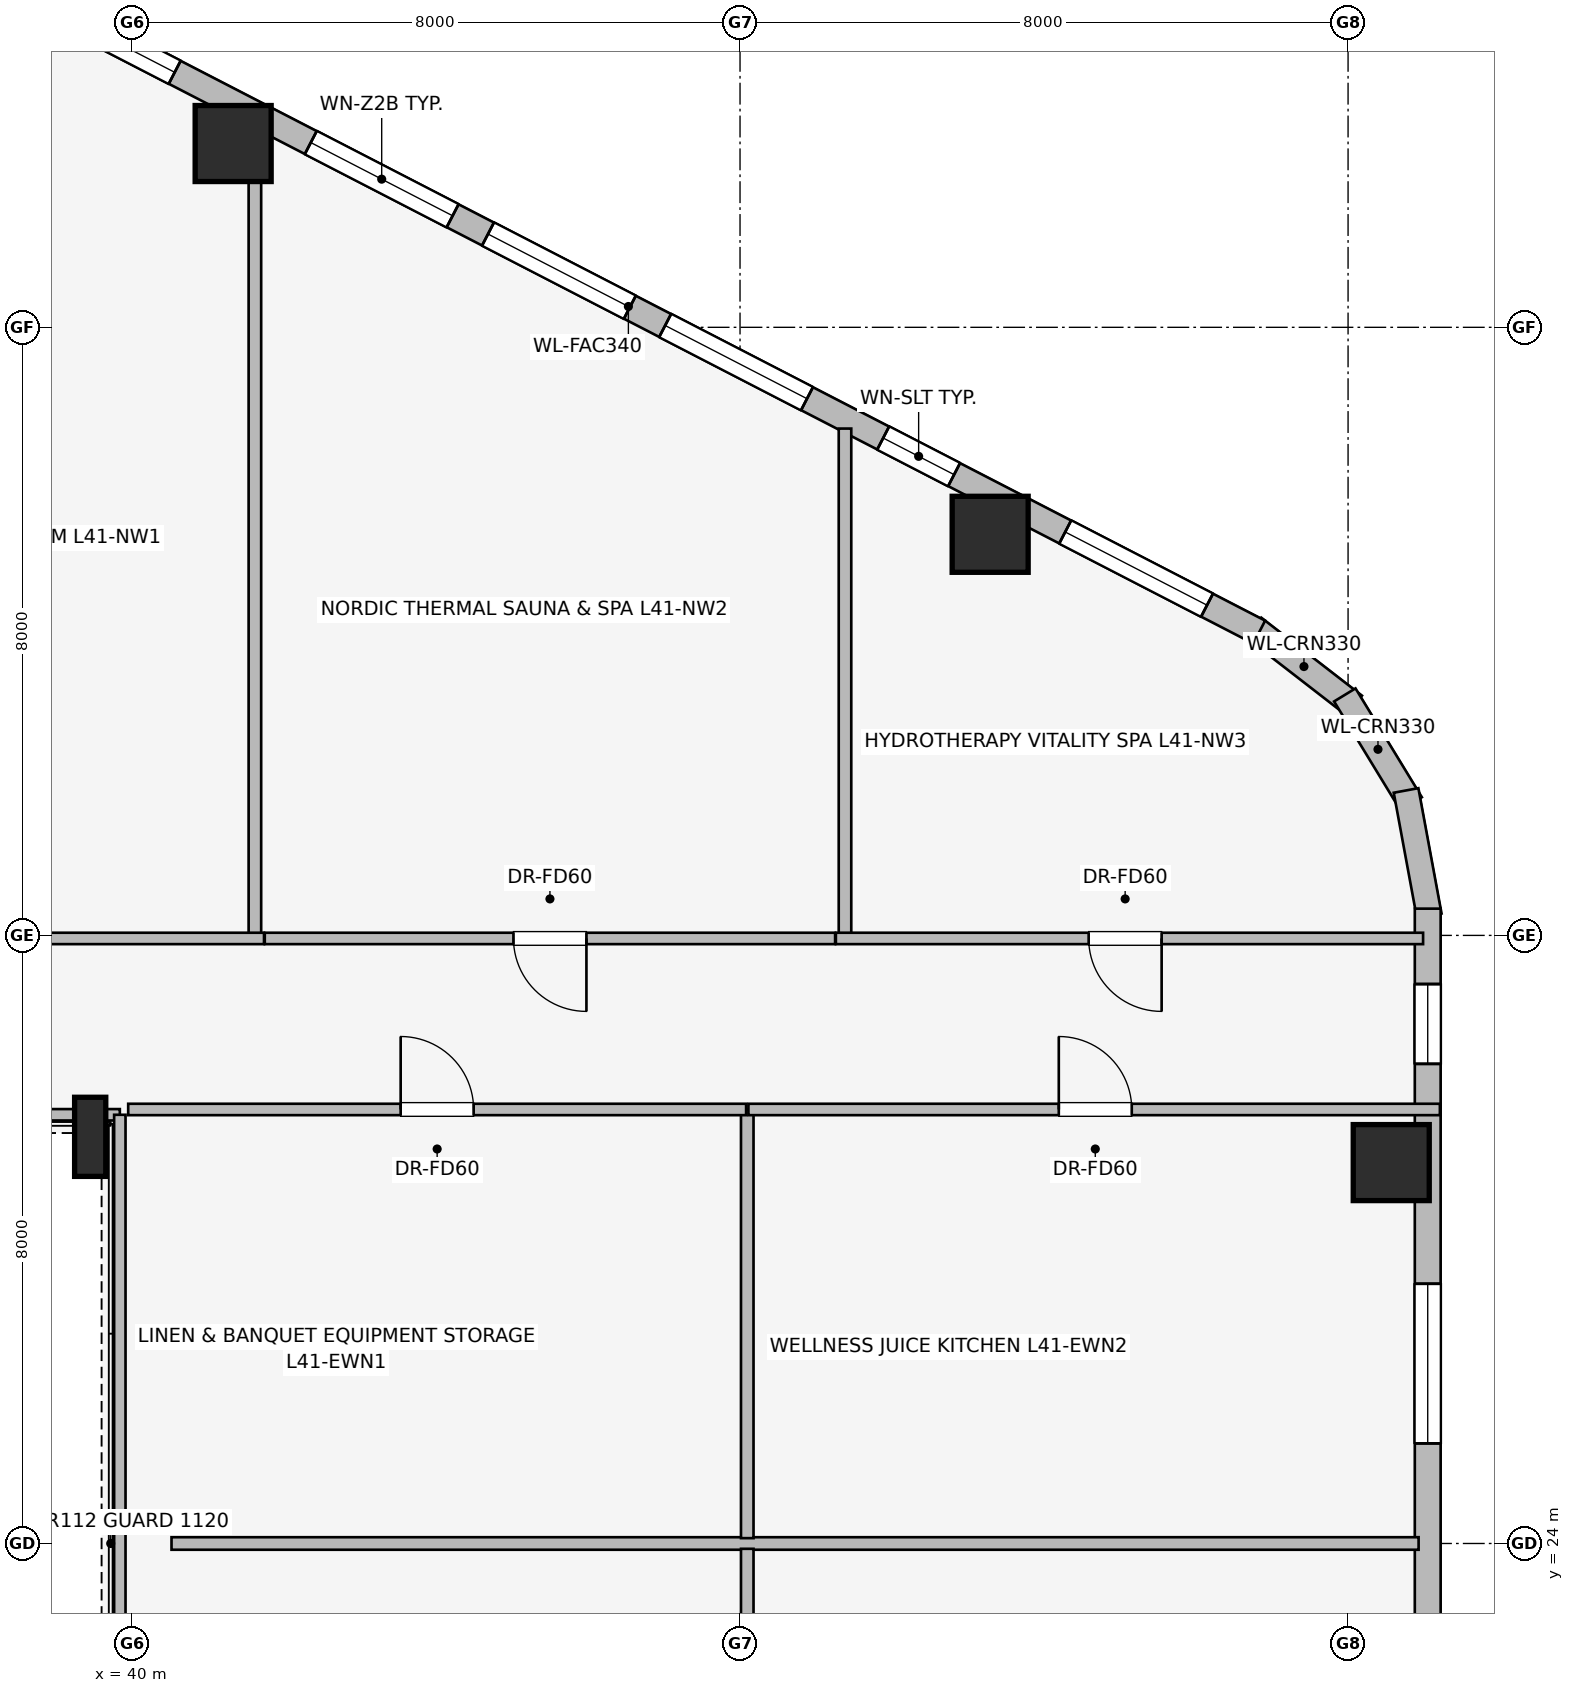
"""IFC4 building model, lengths in metres.
Left out: names, types, materials, properties, quantities, classifications, styles, units other than length and angle.
Written with IfcOpenShell. Run it as: python <this file> out.ifc"""

import sys

from ifc_helpers import new_model, si_unit, direction, frame, frame_2d, origin, origin_2d, place, context, subcontext, project, spatial, rectangle, i_section, extrude, element, fill, save


model = new_model("IFC4")
c1 = context("Model", 3, precision=1e-05, world=origin(), true_north=direction((0.0, 1.0)))
c2 = subcontext(c1, "Body", "Model", "MODEL_VIEW")
j1 = project(units=[si_unit("LENGTHUNIT", "METRE"), si_unit("PLANEANGLEUNIT", "RADIAN")], contexts=[c1])
p1 = place(None, origin())
s1 = spatial("IfcSite", under=j1, at=p1, CompositionType="ELEMENT")
p2 = place(p1, origin())
s2 = spatial("IfcBuilding", under=s1, at=p2, CompositionType="ELEMENT")
p3 = place(p2, frame((0.0, 0.0, 153.3)))
s3 = spatial("IfcBuildingStorey", under=s2, at=p3, CompositionType="ELEMENT", Elevation=153.3)
for number, where, z_axis, x_axis in (
    (1, (51.291, 37.277, 0.0), (0.0, 0.0, 1.0), (1.0, 0.0, 0.0)),
    (2, (41.331, 42.418, 0.0), (0.0, 0.0, 1.0), (1.0, 0.0, 0.0)),
    (3, (56.568, 29.011, 0.0), (0.0, 0.0, 1.0), (1.0, 0.0, 0.0)),
):
    element("IfcColumn", number, at=place(p3, frame(where, z_axis=z_axis, x_axis=x_axis)), inside=s3, PredefinedType="COLUMN", context=c2, shape_type="SweptSolid", body=[
        extrude(rectangle(XDim=1.0, YDim=1.0, at=origin_2d()), origin(), (0.0, 0.0, 1.0), 3.45),
    ])
p4 = place(p3, frame((39.45, 29.35, 0.0), z_axis=(0.0, 0.0, 1.0), x_axis=(1.0, 0.0, 0.0)))
e4 = element("IfcColumn", 4, at=p4, inside=s3, PredefinedType="COLUMN", context=c2, shape_type="SweptSolid", body=[
    extrude(i_section(OverallWidth=0.41, OverallDepth=1.041, WebThickness=0.031, FlangeThickness=0.056, at=origin_2d()), origin(), (0.0, 0.0, 1.0), 3.45),
])
p5 = place(p3, frame((54.757, 36.05, 0.0), z_axis=(0.0, 0.0, 1.0), x_axis=(0.790621329885, -0.612305408053, 0.0)))
e5 = element("IfcWall", 5, at=p5, inside=s3, PredefinedType="STANDARD", context=c2, shape_type="SweptSolid", body=[
    extrude(rectangle(XDim=1.676, YDim=0.33, at=frame_2d((0.838, 0.0))), origin(), (0.0, 0.0, 1.0), 3.19),
])
p6 = place(p3, frame((55.957, 35.164, 0.0), z_axis=(0.0, 0.0, 1.0), x_axis=(0.520519429557, -0.853849824883, 0.0)))
e6 = element("IfcWall", 6, at=p6, inside=s3, PredefinedType="STANDARD", context=c2, shape_type="SweptSolid", body=[
    extrude(rectangle(XDim=1.677, YDim=0.33, at=frame_2d((0.839, 0.0))), origin(), (0.0, 0.0, 1.0), 3.19),
])
p7 = place(p3, frame((56.763, 33.907, 0.0), z_axis=(0.0, 0.0, 1.0), x_axis=(0.181984991895, -0.983301308209, 0.0)))
e7 = element("IfcWall", 7, at=p7, inside=s3, PredefinedType="STANDARD", context=c2, shape_type="SweptSolid", body=[
    extrude(rectangle(XDim=1.677, YDim=0.33, at=frame_2d((0.838, 0.0))), origin(), (0.0, 0.0, 1.0), 3.19),
])
p8 = place(p3, frame((38.231, 44.558, 0.0), z_axis=(0.0, 0.0, 1.0), x_axis=(0.888613612362, -0.458656568606, 0.0)))
e8 = element("IfcWall", 8, at=p8, inside=s3, PredefinedType="STANDARD", context=c2, shape_type="SweptSolid", body=[
    extrude(rectangle(XDim=18.681, YDim=0.34, at=frame_2d((9.34, 0.0))), origin(), (0.0, 0.0, 1.0), 3.19),
])
p9 = place(p8, frame((1.023, 0.0, 0.75)))
e9 = element("IfcOpeningElement", 9, at=p9, cuts=e8, PredefinedType="OPENING", context=c2, shape_type="SweptSolid", body=[
    extrude(rectangle(XDim=1.6, YDim=1.55, at=frame_2d((0.8, 0.775))), frame((0.0, 0.18, 0.0), z_axis=(0.0, -1.0, 0.0), x_axis=(1.0, 0.0, 0.0)), (0.0, 0.0, 1.0), 0.36),
])
p10 = place(p8, frame((4.638, 0.0, 0.75)))
e10 = element("IfcOpeningElement", 10, at=p10, cuts=e8, PredefinedType="OPENING", context=c2, shape_type="SweptSolid", body=[
    extrude(rectangle(XDim=2.1, YDim=1.5, at=frame_2d((1.05, 0.75))), frame((0.0, 0.18, 0.0), z_axis=(0.0, -1.0, 0.0), x_axis=(1.0, 0.0, 0.0)), (0.0, 0.0, 1.0), 0.36),
])
p11 = place(p8, frame((7.262, 0.0, 0.75)))
e11 = element("IfcOpeningElement", 11, at=p11, cuts=e8, PredefinedType="OPENING", context=c2, shape_type="SweptSolid", body=[
    extrude(rectangle(XDim=2.1, YDim=1.5, at=frame_2d((1.05, 0.75))), frame((0.0, 0.18, 0.0), z_axis=(0.0, -1.0, 0.0), x_axis=(1.0, 0.0, 0.0)), (0.0, 0.0, 1.0), 0.36),
])
p12 = place(p8, frame((9.885, 0.0, 0.75)))
e12 = element("IfcOpeningElement", 12, at=p12, cuts=e8, PredefinedType="OPENING", context=c2, shape_type="SweptSolid", body=[
    extrude(rectangle(XDim=2.1, YDim=1.5, at=frame_2d((1.05, 0.75))), frame((0.0, 0.18, 0.0), z_axis=(0.0, -1.0, 0.0), x_axis=(1.0, 0.0, 0.0)), (0.0, 0.0, 1.0), 0.36),
])
p13 = place(p8, frame((13.113, 0.0, 0.75)))
e13 = element("IfcOpeningElement", 13, at=p13, cuts=e8, PredefinedType="OPENING", context=c2, shape_type="SweptSolid", body=[
    extrude(rectangle(XDim=1.05, YDim=1.4, at=frame_2d((0.525, 0.7))), frame((0.0, 0.18, 0.0), z_axis=(0.0, -1.0, 0.0), x_axis=(1.0, 0.0, 0.0)), (0.0, 0.0, 1.0), 0.36),
])
p14 = place(p8, frame((15.808, 0.0, 0.75)))
e14 = element("IfcOpeningElement", 14, at=p14, cuts=e8, PredefinedType="OPENING", context=c2, shape_type="SweptSolid", body=[
    extrude(rectangle(XDim=2.1, YDim=1.5, at=frame_2d((1.05, 0.75))), frame((0.0, 0.18, 0.0), z_axis=(0.0, -1.0, 0.0), x_axis=(1.0, 0.0, 0.0)), (0.0, 0.0, 1.0), 0.36),
])
p15 = place(p3, frame((57.048, 32.352, 0.0), z_axis=(0.0, 0.0, 1.0), x_axis=(0.0, -1.0, 0.0)))
e15 = element("IfcWall", 15, at=p15, inside=s3, PredefinedType="STANDARD", context=c2, shape_type="SweptSolid", body=[
    extrude(rectangle(XDim=16.704, YDim=0.34, at=frame_2d((8.352, 0.0))), origin(), (0.0, 0.0, 1.0), 3.19),
])
p16 = place(p15, frame((0.992, 0.0, 0.75)))
e16 = element("IfcOpeningElement", 16, at=p16, cuts=e15, PredefinedType="OPENING", context=c2, shape_type="SweptSolid", body=[
    extrude(rectangle(XDim=1.05, YDim=1.4, at=frame_2d((0.525, 0.7))), frame((0.0, 0.18, 0.0), z_axis=(0.0, -1.0, 0.0), x_axis=(1.0, 0.0, 0.0)), (0.0, 0.0, 1.0), 0.36),
])
p17 = place(p15, frame((4.935, 0.0, 0.75)))
e17 = element("IfcOpeningElement", 17, at=p17, cuts=e15, PredefinedType="OPENING", context=c2, shape_type="SweptSolid", body=[
    extrude(rectangle(XDim=2.1, YDim=1.5, at=frame_2d((1.05, 0.75))), frame((0.0, 0.18, 0.0), z_axis=(0.0, -1.0, 0.0), x_axis=(1.0, 0.0, 0.0)), (0.0, 0.0, 1.0), 0.36),
])
p18 = place(p15, frame((9.919, 0.0, 0.75)))
e18 = element("IfcOpeningElement", 18, at=p18, cuts=e15, PredefinedType="OPENING", context=c2, shape_type="SweptSolid", body=[
    extrude(rectangle(XDim=1.6, YDim=1.55, at=frame_2d((0.8, 0.775))), frame((0.0, 0.18, 0.0), z_axis=(0.0, -1.0, 0.0), x_axis=(1.0, 0.0, 0.0)), (0.0, 0.0, 1.0), 0.36),
])
p19 = place(p15, frame((14.702, 0.0, 0.75)))
e19 = element("IfcOpeningElement", 19, at=p19, cuts=e15, PredefinedType="OPENING", context=c2, shape_type="SweptSolid", body=[
    extrude(rectangle(XDim=1.05, YDim=1.4, at=frame_2d((0.525, 0.7))), frame((0.0, 0.18, 0.0), z_axis=(0.0, -1.0, 0.0), x_axis=(1.0, 0.0, 0.0)), (0.0, 0.0, 1.0), 0.36),
])
p20 = place(p3, frame((39.84, 29.64, 0.0), z_axis=(0.0, 0.0, 1.0), x_axis=(-1.0, 0.0, 0.0)))
e20 = element("IfcWall", 20, at=p20, inside=s3, PredefinedType="PARTITIONING", context=c2, shape_type="SweptSolid", body=[
    extrude(rectangle(XDim=12.2, YDim=0.15, at=frame_2d((6.1, 0.0))), origin(), (0.0, 0.0, 1.0), 2.331),
])
p21 = place(p3, frame((39.84, 18.36, 0.0), z_axis=(0.0, 0.0, 1.0), x_axis=(0.0, 1.0, 0.0)))
e21 = element("IfcWall", 21, at=p21, inside=s3, PredefinedType="PARTITIONING", context=c2, shape_type="SweptSolid", body=[
    extrude(rectangle(XDim=11.28, YDim=0.15, at=frame_2d((5.64, 0.0))), origin(), (0.0, 0.0, 1.0), 3.19),
])
p22 = place(p3, frame((41.617, 31.97, 0.0), z_axis=(0.0, 0.0, 1.0), x_axis=(0.0, 1.0, 0.0)))
e22 = element("IfcWall", 22, at=p22, inside=s3, PredefinedType="PARTITIONING", context=c2, shape_type="SweptSolid", body=[
    extrude(rectangle(XDim=10.705, YDim=0.165, at=frame_2d((5.353, 0.0))), origin(), (0.0, 0.0, 1.0), 2.42),
])
p23 = place(p3, frame((49.381, 31.97, 0.0), z_axis=(0.0, 0.0, 1.0), x_axis=(0.0, 1.0, 0.0)))
e23 = element("IfcWall", 23, at=p23, inside=s3, PredefinedType="PARTITIONING", context=c2, shape_type="SweptSolid", body=[
    extrude(rectangle(XDim=6.698, YDim=0.165, at=frame_2d((3.349, 0.0))), origin(), (0.0, 0.0, 1.0), 3.19),
])
p24 = place(p3, frame((41.737, 31.96, 0.0), z_axis=(0.0, 0.0, 1.0), x_axis=(-1.0, 0.0, 0.0)))
e24 = element("IfcWall", 24, at=p24, inside=s3, PredefinedType="PARTITIONING", context=c2, shape_type="SweptSolid", body=[
    extrude(rectangle(XDim=7.447, YDim=0.15, at=frame_2d((3.724, 0.0))), origin(), (0.0, 0.0, 1.0), 3.19),
])
p25 = place(p24, frame((3.187, 0.0, 0.0)))
e25 = element("IfcOpeningElement", 25, at=p25, cuts=e24, PredefinedType="OPENING", context=c2, shape_type="SweptSolid", body=[
    extrude(rectangle(XDim=0.96, YDim=2.0, at=frame_2d((0.48, 1.0))), frame((0.0, 0.085, 0.0), z_axis=(0.0, -1.0, 0.0), x_axis=(1.0, 0.0, 0.0)), (0.0, 0.0, 1.0), 0.17),
])
p26 = place(p3, frame((49.251, 31.96, 0.0), z_axis=(0.0, 0.0, 1.0), x_axis=(-1.0, 0.0, 0.0)))
e26 = element("IfcWall", 26, at=p26, inside=s3, PredefinedType="PARTITIONING", context=c2, shape_type="SweptSolid", body=[
    extrude(rectangle(XDim=7.504, YDim=0.15, at=frame_2d((3.752, 0.0))), origin(), (0.0, 0.0, 1.0), 3.19),
])
p27 = place(p26, frame((3.272, 0.0, 0.0)))
e27 = element("IfcOpeningElement", 27, at=p27, cuts=e26, PredefinedType="OPENING", context=c2, shape_type="SweptSolid", body=[
    extrude(rectangle(XDim=0.96, YDim=2.0, at=frame_2d((0.48, 1.0))), frame((0.0, 0.085, 0.0), z_axis=(0.0, -1.0, 0.0), x_axis=(1.0, 0.0, 0.0)), (0.0, 0.0, 1.0), 0.17),
])
p28 = place(p3, frame((56.987, 31.96, 0.0), z_axis=(0.0, 0.0, 1.0), x_axis=(-1.0, 0.0, 0.0)))
e28 = element("IfcWall", 28, at=p28, inside=s3, PredefinedType="PARTITIONING", context=c2, shape_type="SweptSolid", body=[
    extrude(rectangle(XDim=7.726, YDim=0.15, at=frame_2d((3.863, 0.0))), origin(), (0.0, 0.0, 1.0), 3.19),
])
p29 = place(p28, frame((3.44, 0.0, 0.0)))
e29 = element("IfcOpeningElement", 29, at=p29, cuts=e28, PredefinedType="OPENING", context=c2, shape_type="SweptSolid", body=[
    extrude(rectangle(XDim=0.96, YDim=2.0, at=frame_2d((0.48, 1.0))), frame((0.0, 0.085, 0.0), z_axis=(0.0, -1.0, 0.0), x_axis=(1.0, 0.0, 0.0)), (0.0, 0.0, 1.0), 0.17),
])
p30 = place(p3, frame((40.52, 24.0, 0.0), z_axis=(0.0, 0.0, 1.0), x_axis=(1.0, 0.0, 0.0)))
e30 = element("IfcWall", 30, at=p30, inside=s3, PredefinedType="PARTITIONING", context=c2, shape_type="SweptSolid", body=[
    extrude(rectangle(XDim=16.408, YDim=0.165, at=frame_2d((8.204, 0.0))), origin(), (0.0, 0.0, 1.0), 3.19),
])
p31 = place(p3, frame((48.095, 24.07, 0.0), z_axis=(0.0, 0.0, 1.0), x_axis=(0.0, 1.0, 0.0)))
e31 = element("IfcWall", 31, at=p31, inside=s3, PredefinedType="PARTITIONING", context=c2, shape_type="SweptSolid", body=[
    extrude(rectangle(XDim=5.64, YDim=0.165, at=frame_2d((2.82, 0.0))), origin(), (0.0, 0.0, 1.0), 3.19),
])
p32 = place(p3, frame((39.95, 29.71, 0.0), z_axis=(0.0, 0.0, 1.0), x_axis=(1.0, 0.0, 0.0)))
e32 = element("IfcWall", 32, at=p32, inside=s3, PredefinedType="PARTITIONING", context=c2, shape_type="SweptSolid", body=[
    extrude(rectangle(XDim=8.13, YDim=0.15, at=frame_2d((4.065, 0.0))), origin(), (0.0, 0.0, 1.0), 3.19),
])
p33 = place(p32, frame((3.585, 0.0, 0.0)))
e33 = element("IfcOpeningElement", 33, at=p33, cuts=e32, PredefinedType="OPENING", context=c2, shape_type="SweptSolid", body=[
    extrude(rectangle(XDim=0.96, YDim=2.0, at=frame_2d((0.48, 1.0))), frame((0.0, 0.085, 0.0), z_axis=(0.0, -1.0, 0.0), x_axis=(1.0, 0.0, 0.0)), (0.0, 0.0, 1.0), 0.17),
])
p34 = place(p3, frame((48.11, 29.71, 0.0), z_axis=(0.0, 0.0, 1.0), x_axis=(1.0, 0.0, 0.0)))
e34 = element("IfcWall", 34, at=p34, inside=s3, PredefinedType="PARTITIONING", context=c2, shape_type="SweptSolid", body=[
    extrude(rectangle(XDim=9.098, YDim=0.15, at=frame_2d((4.549, 0.0))), origin(), (0.0, 0.0, 1.0), 3.19),
])
p35 = place(p34, frame((4.084, 0.0, 0.0)))
e35 = element("IfcOpeningElement", 35, at=p35, cuts=e34, PredefinedType="OPENING", context=c2, shape_type="SweptSolid", body=[
    extrude(rectangle(XDim=0.96, YDim=2.0, at=frame_2d((0.48, 1.0))), frame((0.0, 0.085, 0.0), z_axis=(0.0, -1.0, 0.0), x_axis=(1.0, 0.0, 0.0)), (0.0, 0.0, 1.0), 0.17),
])
p36 = place(p3, frame((48.095, 18.29, 0.0), z_axis=(0.0, 0.0, 1.0), x_axis=(0.0, 1.0, 0.0)))
e36 = element("IfcWall", 36, at=p36, inside=s3, PredefinedType="PARTITIONING", context=c2, shape_type="SweptSolid", body=[
    extrude(rectangle(XDim=5.64, YDim=0.165, at=frame_2d((2.82, 0.0))), origin(), (0.0, 0.0, 1.0), 3.19),
])
p37 = place(p9, origin())
e37 = element("IfcWindow", 37, at=p37, inside=s3, PartitioningType="SINGLE_PANEL", PredefinedType="WINDOW", context=c2, shape_type="SweptSolid", body=[
    extrude(rectangle(XDim=1.6, YDim=1.55, at=frame_2d((0.8, 0.775))), frame((0.0, 0.03, 0.0), z_axis=(0.0, -1.0, 0.0), x_axis=(1.0, 0.0, 0.0)), (0.0, 0.0, 1.0), 0.06),
])
fill(e9, e37)
p38 = place(p10, origin())
e38 = element("IfcWindow", 38, at=p38, inside=s3, PartitioningType="SINGLE_PANEL", PredefinedType="WINDOW", context=c2, shape_type="SweptSolid", body=[
    extrude(rectangle(XDim=2.1, YDim=1.5, at=frame_2d((1.05, 0.75))), frame((0.0, 0.03, 0.0), z_axis=(0.0, -1.0, 0.0), x_axis=(1.0, 0.0, 0.0)), (0.0, 0.0, 1.0), 0.06),
])
fill(e10, e38)
p39 = place(p11, origin())
e39 = element("IfcWindow", 39, at=p39, inside=s3, PartitioningType="SINGLE_PANEL", PredefinedType="WINDOW", context=c2, shape_type="SweptSolid", body=[
    extrude(rectangle(XDim=2.1, YDim=1.5, at=frame_2d((1.05, 0.75))), frame((0.0, 0.03, 0.0), z_axis=(0.0, -1.0, 0.0), x_axis=(1.0, 0.0, 0.0)), (0.0, 0.0, 1.0), 0.06),
])
fill(e11, e39)
p40 = place(p12, origin())
e40 = element("IfcWindow", 40, at=p40, inside=s3, PartitioningType="SINGLE_PANEL", PredefinedType="WINDOW", context=c2, shape_type="SweptSolid", body=[
    extrude(rectangle(XDim=2.1, YDim=1.5, at=frame_2d((1.05, 0.75))), frame((0.0, 0.03, 0.0), z_axis=(0.0, -1.0, 0.0), x_axis=(1.0, 0.0, 0.0)), (0.0, 0.0, 1.0), 0.06),
])
fill(e12, e40)
p41 = place(p13, origin())
e41 = element("IfcWindow", 41, at=p41, inside=s3, PartitioningType="SINGLE_PANEL", PredefinedType="WINDOW", context=c2, shape_type="SweptSolid", body=[
    extrude(rectangle(XDim=1.05, YDim=1.4, at=frame_2d((0.525, 0.7))), frame((0.0, 0.03, 0.0), z_axis=(0.0, -1.0, 0.0), x_axis=(1.0, 0.0, 0.0)), (0.0, 0.0, 1.0), 0.06),
])
fill(e13, e41)
p42 = place(p14, origin())
e42 = element("IfcWindow", 42, at=p42, inside=s3, PartitioningType="SINGLE_PANEL", PredefinedType="WINDOW", context=c2, shape_type="SweptSolid", body=[
    extrude(rectangle(XDim=2.1, YDim=1.5, at=frame_2d((1.05, 0.75))), frame((0.0, 0.03, 0.0), z_axis=(0.0, -1.0, 0.0), x_axis=(1.0, 0.0, 0.0)), (0.0, 0.0, 1.0), 0.06),
])
fill(e14, e42)
p43 = place(p16, origin())
e43 = element("IfcWindow", 43, at=p43, inside=s3, PartitioningType="SINGLE_PANEL", PredefinedType="WINDOW", context=c2, shape_type="SweptSolid", body=[
    extrude(rectangle(XDim=1.05, YDim=1.4, at=frame_2d((0.525, 0.7))), frame((0.0, 0.03, 0.0), z_axis=(0.0, -1.0, 0.0), x_axis=(1.0, 0.0, 0.0)), (0.0, 0.0, 1.0), 0.06),
])
fill(e16, e43)
p44 = place(p17, origin())
e44 = element("IfcWindow", 44, at=p44, inside=s3, PartitioningType="SINGLE_PANEL", PredefinedType="WINDOW", context=c2, shape_type="SweptSolid", body=[
    extrude(rectangle(XDim=2.1, YDim=1.5, at=frame_2d((1.05, 0.75))), frame((0.0, 0.03, 0.0), z_axis=(0.0, -1.0, 0.0), x_axis=(1.0, 0.0, 0.0)), (0.0, 0.0, 1.0), 0.06),
])
fill(e17, e44)
p45 = place(p27, origin())
e45 = element("IfcDoor", 45, at=p45, inside=s3, OperationType="SINGLE_SWING_LEFT", PredefinedType="DOOR", context=c2, shape_type="SweptSolid", body=[
    extrude(rectangle(XDim=0.96, YDim=2.0, at=frame_2d((0.48, 1.0))), frame((0.0, 0.025, 0.0), z_axis=(0.0, -1.0, 0.0), x_axis=(1.0, 0.0, 0.0)), (0.0, 0.0, 1.0), 0.05),
])
fill(e27, e45)
p46 = place(p29, origin())
e46 = element("IfcDoor", 46, at=p46, inside=s3, OperationType="SINGLE_SWING_LEFT", PredefinedType="DOOR", context=c2, shape_type="SweptSolid", body=[
    extrude(rectangle(XDim=0.96, YDim=2.0, at=frame_2d((0.48, 1.0))), frame((0.0, 0.025, 0.0), z_axis=(0.0, -1.0, 0.0), x_axis=(1.0, 0.0, 0.0)), (0.0, 0.0, 1.0), 0.05),
])
fill(e29, e46)
p47 = place(p33, origin())
e47 = element("IfcDoor", 47, at=p47, inside=s3, OperationType="SINGLE_SWING_LEFT", PredefinedType="DOOR", context=c2, shape_type="SweptSolid", body=[
    extrude(rectangle(XDim=0.96, YDim=2.0, at=frame_2d((0.48, 1.0))), frame((0.0, 0.025, 0.0), z_axis=(0.0, -1.0, 0.0), x_axis=(1.0, 0.0, 0.0)), (0.0, 0.0, 1.0), 0.05),
])
fill(e33, e47)
p48 = place(p35, origin())
e48 = element("IfcDoor", 48, at=p48, inside=s3, OperationType="SINGLE_SWING_LEFT", PredefinedType="DOOR", context=c2, shape_type="SweptSolid", body=[
    extrude(rectangle(XDim=0.96, YDim=2.0, at=frame_2d((0.48, 1.0))), frame((0.0, 0.025, 0.0), z_axis=(0.0, -1.0, 0.0), x_axis=(1.0, 0.0, 0.0)), (0.0, 0.0, 1.0), 0.05),
])
fill(e35, e48)
save(model, sys.argv[1])
